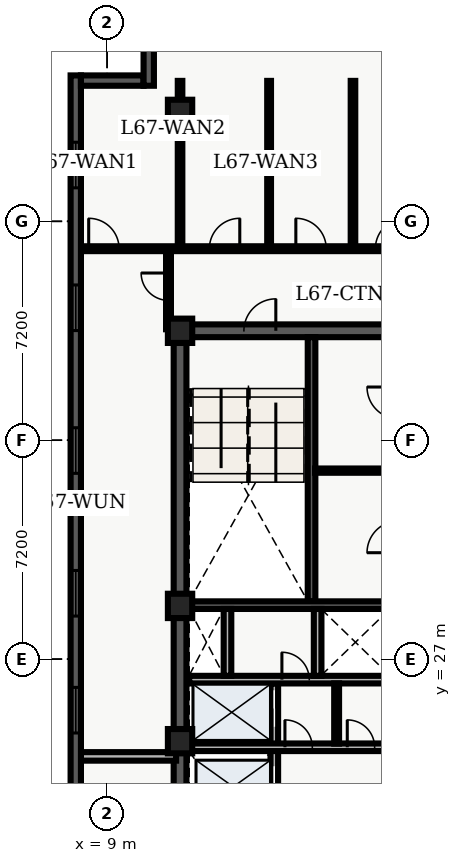
"""IFC4 building model, lengths in metres.
Left out: names, types, materials, properties, quantities, classifications, styles, units other than length and angle.
Written with IfcOpenShell. Run it as: python <this file> out.ifc"""

import sys

from ifc_helpers import new_model, entity, si_unit, converted_unit, direction, frame, origin_with_axes, origin_2d_with_axis, place, context, subcontext, project, spatial, polyline, rectangle, outline, extrude, element, fill, save


model = new_model("IFC4")
c1 = context("Model", 3, precision=1e-05, world=origin_with_axes(), true_north=direction((0.0, 1.0)))
c2 = subcontext(c1, "Body", "Model", "MODEL_VIEW")
j1 = project(units=[si_unit("LENGTHUNIT", "METRE"), converted_unit("PLANEANGLEUNIT", "DEGREE", entity("IfcPlaneAngleMeasure", 0.017), si_unit("PLANEANGLEUNIT", "RADIAN"), dimensions=[0, 0, 0, 0, 0, 0, 0])], contexts=[c1])
p1 = place(None, origin_with_axes())
s1 = spatial("IfcSite", under=j1, at=p1, CompositionType="ELEMENT")
p2 = place(p1, origin_with_axes())
s2 = spatial("IfcBuilding", under=s1, at=p2, CompositionType="ELEMENT")
p3 = place(p2, frame((0.0, 0.0, 272.4), z_axis=(0.0, 0.0, 1.0), x_axis=(1.0, 0.0, 0.0)))
s3 = spatial("IfcBuildingStorey", under=s2, at=p3, CompositionType="ELEMENT", Elevation=272.4)
p4 = place(p3, frame((11.4, 10.8, 0.0), z_axis=(0.0, 0.0, 1.0), x_axis=(0.0, 1.0, 0.0)))
e1 = element("IfcWall", 1, at=p4, inside=s3, PredefinedType="SHEAR", context=c2, shape_type="SweptSolid", body=[
    extrude(outline(polyline([(0.0, -0.21), (27.0, -0.21), (27.0, 0.21), (0.0, 0.21), (0.0, -0.21)])), origin_with_axes(), (0.0, 0.0, 1.0), 3.66),
])
p5 = place(p3, frame((11.4, 37.8, 0.0), z_axis=(0.0, 0.0, 1.0), x_axis=(1.0, 0.0, 0.0)))
e2 = element("IfcWall", 2, at=p5, inside=s3, PredefinedType="SHEAR", context=c2, shape_type="SweptSolid", body=[
    extrude(outline(polyline([(0.0, -0.21), (7.2, -0.21), (7.2, 0.21), (0.0, 0.21), (0.0, -0.21)])), origin_with_axes(), (0.0, 0.0, 1.0), 3.66),
])
p6 = place(p5, frame((2.625, 0.0, 0.0), z_axis=(0.0, 0.0, 1.0), x_axis=(1.0, 0.0, 0.0)))
e3 = element("IfcOpeningElement", 3, at=p6, cuts=e2, PredefinedType="OPENING", context=c2, shape_type="SweptSolid", body=[
    extrude(rectangle(XDim=1.05, YDim=0.44, at=origin_2d_with_axis()), origin_with_axes(), (0.0, 0.0, 1.0), 2.15),
])
p7 = place(p3, frame((15.725, 28.9, 0.0), z_axis=(0.0, 0.0, 1.0), x_axis=(0.0, 1.0, 0.0)))
e4 = element("IfcWall", 4, at=p7, inside=s3, PredefinedType="SHEAR", context=c2, shape_type="SweptSolid", body=[
    extrude(outline(polyline([(0.0, -0.125), (8.69, -0.125), (8.69, 0.125), (0.0, 0.125), (0.0, -0.125)])), origin_with_axes(), (0.0, 0.0, 1.0), 3.66),
])
p8 = place(p3, frame((11.61, 28.775, 0.0), z_axis=(0.0, 0.0, 1.0), x_axis=(1.0, 0.0, 0.0)))
e5 = element("IfcWall", 5, at=p8, inside=s3, PredefinedType="SHEAR", context=c2, shape_type="SweptSolid", body=[
    extrude(outline(polyline([(0.0, -0.125), (6.78, -0.125), (6.78, 0.125), (0.0, 0.125), (0.0, -0.125)])), origin_with_axes(), (0.0, 0.0, 1.0), 3.66),
])
p9 = place(p3, frame((14.5, 19.95, 0.0), z_axis=(0.0, 0.0, 1.0), x_axis=(0.0, 1.0, 0.0)))
e6 = element("IfcWall", 6, at=p9, inside=s3, PredefinedType="SOLIDWALL", context=c2, shape_type="SweptSolid", body=[
    extrude(outline(polyline([(0.0, -0.125), (6.25, -0.125), (6.25, 0.125), (0.0, 0.125), (0.0, -0.125)])), origin_with_axes(), (0.0, 0.0, 1.0), 2.7),
])
p10 = place(p9, frame((1.025, 0.0, 0.0), z_axis=(0.0, 0.0, 1.0), x_axis=(1.0, 0.0, 0.0)))
e7 = element("IfcOpeningElement", 7, at=p10, cuts=e6, PredefinedType="OPENING", context=c2, shape_type="SweptSolid", body=[
    extrude(rectangle(XDim=1.1, YDim=0.27, at=origin_2d_with_axis()), origin_with_axes(), (0.0, 0.0, 1.0), 2.15),
])
p11 = place(p9, frame((2.975, 0.0, 0.0), z_axis=(0.0, 0.0, 1.0), x_axis=(1.0, 0.0, 0.0)))
e8 = element("IfcOpeningElement", 8, at=p11, cuts=e6, PredefinedType="OPENING", context=c2, shape_type="SweptSolid", body=[
    extrude(rectangle(XDim=1.1, YDim=0.27, at=origin_2d_with_axis()), origin_with_axes(), (0.0, 0.0, 1.0), 2.15),
])
p12 = place(p9, frame((5.425, 0.0, 0.0), z_axis=(0.0, 0.0, 1.0), x_axis=(1.0, 0.0, 0.0)))
e9 = element("IfcOpeningElement", 9, at=p12, cuts=e6, PredefinedType="OPENING", context=c2, shape_type="SweptSolid", body=[
    extrude(rectangle(XDim=1.2, YDim=0.27, at=origin_2d_with_axis()), origin_with_axes(), (0.0, 0.0, 1.0), 2.15),
])
p13 = place(p3, frame((11.7, 24.1, 0.0), z_axis=(0.0, 0.0, 1.0), x_axis=(1.0, 0.0, 0.0)))
e10 = element("IfcWall", 10, at=p13, inside=s3, PredefinedType="SOLIDWALL", context=c2, shape_type="SweptSolid", body=[
    extrude(outline(polyline([(0.0, -0.125), (6.6, -0.125), (6.6, 0.125), (0.0, 0.125), (0.0, -0.125)])), origin_with_axes(), (0.0, 0.0, 1.0), 2.7),
])
p14 = place(p13, frame((3.6, 0.0, 0.0), z_axis=(0.0, 0.0, 1.0), x_axis=(1.0, 0.0, 0.0)))
e11 = element("IfcOpeningElement", 11, at=p14, cuts=e10, PredefinedType="OPENING", context=c2, shape_type="SweptSolid", body=[
    extrude(rectangle(XDim=0.9, YDim=0.27, at=origin_2d_with_axis()), origin_with_axes(), (0.0, 0.0, 1.0), 2.15),
])
p15 = place(p13, frame((5.65, 0.0, 0.0), z_axis=(0.0, 0.0, 1.0), x_axis=(1.0, 0.0, 0.0)))
e12 = element("IfcOpeningElement", 12, at=p15, cuts=e10, PredefinedType="OPENING", context=c2, shape_type="SweptSolid", body=[
    extrude(rectangle(XDim=0.9, YDim=0.27, at=origin_2d_with_axis()), origin_with_axes(), (0.0, 0.0, 1.0), 2.15),
])
p16 = place(p3, frame((11.7, 26.325, 0.0), z_axis=(0.0, 0.0, 1.0), x_axis=(1.0, 0.0, 0.0)))
e13 = element("IfcWall", 13, at=p16, inside=s3, PredefinedType="SOLIDWALL", context=c2, shape_type="SweptSolid", body=[
    extrude(outline(polyline([(0.0, -0.125), (6.6, -0.125), (6.6, 0.125), (0.0, 0.125), (0.0, -0.125)])), origin_with_axes(), (0.0, 0.0, 1.0), 2.7),
])
p17 = place(p16, frame((3.5, 0.0, 0.0), z_axis=(0.0, 0.0, 1.0), x_axis=(1.0, 0.0, 0.0)))
e14 = element("IfcOpeningElement", 14, at=p17, cuts=e13, PredefinedType="OPENING", context=c2, shape_type="SweptSolid", body=[
    extrude(rectangle(XDim=0.9, YDim=0.27, at=origin_2d_with_axis()), origin_with_axes(), (0.0, 0.0, 1.0), 2.15),
])
for number, where, z_axis, x_axis in (
    (15, (12.96, 26.45, 0.0), (0.0, 0.0, 1.0), (0.0, 1.0, 0.0)),
    (16, (15.925, 26.45, 0.0), (0.0, 0.0, 1.0), (0.0, 1.0, 0.0)),
):
    element("IfcWall", number, at=place(p3, frame(where, z_axis=z_axis, x_axis=x_axis)), inside=s3, PredefinedType="SOLIDWALL", context=c2, shape_type="SweptSolid", body=[
        extrude(outline(polyline([(0.0, -0.125), (2.2, -0.125), (2.2, 0.125), (0.0, 0.125), (0.0, -0.125)])), origin_with_axes(), (0.0, 0.0, 1.0), 2.7),
    ])
for number, where, z_axis, x_axis in (
    (17, (11.4, 24.3, 0.0), (0.0, 0.0, 1.0), (1.0, 0.0, 0.0)),
    (18, (11.4, 28.75, 0.0), (0.0, 0.0, 1.0), (1.0, 0.0, 0.0)),
    (19, (11.4, 37.8, 0.0), (0.0, 0.0, 1.0), (1.0, 0.0, 0.0)),
    (20, (11.4, 45.0, 0.0), (0.0, 0.0, 1.0), (1.0, 0.0, 0.0)),
):
    element("IfcColumn", number, at=place(p3, frame(where, z_axis=z_axis, x_axis=x_axis)), inside=s3, PredefinedType="COLUMN", context=c2, shape_type="SweptSolid", body=[
        extrude(rectangle(XDim=0.8, YDim=0.8, at=origin_2d_with_axis()), origin_with_axes(), (0.0, 0.0, 1.0), 3.9),
    ])
p18 = place(p3, frame((16.55, 24.22, 0.0), z_axis=(0.0, 0.0, 1.0), x_axis=(0.0, 1.0, 0.0)))
e21 = element("IfcWall", 21, at=p18, inside=s3, PredefinedType="PARTITIONING", context=c2, shape_type="SweptSolid", body=[
    extrude(outline(polyline([(0.0, -0.08), (1.98, -0.08), (1.98, 0.08), (0.0, 0.08), (0.0, -0.08)])), origin_with_axes(), (0.0, 0.0, 1.0), 2.7),
])
p19 = place(p3, frame((15.84, 33.2, 0.0), z_axis=(0.0, 0.0, 1.0), x_axis=(1.0, 0.0, 0.0)))
e22 = element("IfcWall", 22, at=p19, inside=s3, PredefinedType="PARTITIONING", context=c2, shape_type="SweptSolid", body=[
    extrude(outline(polyline([(0.0, -0.07), (2.46, -0.07), (2.46, 0.07), (0.0, 0.07), (0.0, -0.07)])), origin_with_axes(), (0.0, 0.0, 1.0), 2.7),
])
p20 = place(p3, frame((8.135, 40.5, 0.0), z_axis=(0.0, 0.0, 1.0), x_axis=(1.0, 0.0, 0.0)))
e23 = element("IfcWall", 23, at=p20, inside=s3, PredefinedType="PARTITIONING", context=c2, shape_type="SweptSolid", body=[
    extrude(outline(polyline([(0.0, -0.08), (23.93, -0.08), (23.93, 0.08), (0.0, 0.08), (0.0, -0.08)])), origin_with_axes(), (0.0, 0.0, 1.0), 2.7),
])
p21 = place(p20, frame((0.76, 0.0, 0.0), z_axis=(0.0, 0.0, 1.0), x_axis=(1.0, 0.0, 0.0)))
e24 = element("IfcOpeningElement", 24, at=p21, cuts=e23, PredefinedType="OPENING", context=c2, shape_type="SweptSolid", body=[
    extrude(rectangle(XDim=1.0, YDim=0.18, at=origin_2d_with_axis()), origin_with_axes(), (0.0, 0.0, 1.0), 2.15),
])
p22 = place(p20, frame((4.729, 0.0, 0.0), z_axis=(0.0, 0.0, 1.0), x_axis=(1.0, 0.0, 0.0)))
e25 = element("IfcOpeningElement", 25, at=p22, cuts=e23, PredefinedType="OPENING", context=c2, shape_type="SweptSolid", body=[
    extrude(rectangle(XDim=1.0, YDim=0.18, at=origin_2d_with_axis()), origin_with_axes(), (0.0, 0.0, 1.0), 2.15),
])
p23 = place(p20, frame((7.574, 0.0, 0.0), z_axis=(0.0, 0.0, 1.0), x_axis=(1.0, 0.0, 0.0)))
e26 = element("IfcOpeningElement", 26, at=p23, cuts=e23, PredefinedType="OPENING", context=c2, shape_type="SweptSolid", body=[
    extrude(rectangle(XDim=1.0, YDim=0.18, at=origin_2d_with_axis()), origin_with_axes(), (0.0, 0.0, 1.0), 2.15),
])
p24 = place(p20, frame((10.189, 0.0, 0.0), z_axis=(0.0, 0.0, 1.0), x_axis=(1.0, 0.0, 0.0)))
e27 = element("IfcOpeningElement", 27, at=p24, cuts=e23, PredefinedType="OPENING", context=c2, shape_type="SweptSolid", body=[
    extrude(rectangle(XDim=1.0, YDim=0.18, at=origin_2d_with_axis()), origin_with_axes(), (0.0, 0.0, 1.0), 2.15),
])
p25 = place(p3, frame((11.02, 37.85, 0.0), z_axis=(0.0, 0.0, 1.0), x_axis=(0.0, 1.0, 0.0)))
e28 = element("IfcWall", 28, at=p25, inside=s3, PredefinedType="PARTITIONING", context=c2, shape_type="SweptSolid", body=[
    extrude(outline(polyline([(0.0, -0.08), (2.65, -0.08), (2.65, 0.08), (0.0, 0.08), (0.0, -0.08)])), origin_with_axes(), (0.0, 0.0, 1.0), 2.7),
])
p26 = place(p25, frame((1.4, 0.0, 0.0), z_axis=(0.0, 0.0, 1.0), x_axis=(1.0, 0.0, 0.0)))
e29 = element("IfcOpeningElement", 29, at=p26, cuts=e28, PredefinedType="OPENING", context=c2, shape_type="SweptSolid", body=[
    extrude(rectangle(XDim=0.9, YDim=0.18, at=origin_2d_with_axis()), origin_with_axes(), (0.0, 0.0, 1.0), 2.15),
])
p27 = place(p3, frame((8.135, 23.8, 0.0), z_axis=(0.0, 0.0, 1.0), x_axis=(1.0, 0.0, 0.0)))
e30 = element("IfcWall", 30, at=p27, inside=s3, PredefinedType="PARTITIONING", context=c2, shape_type="SweptSolid", body=[
    extrude(outline(polyline([(0.0, -0.14), (3.135, -0.14), (3.135, 0.14), (0.0, 0.14), (0.0, -0.14)])), origin_with_axes(), (0.0, 0.0, 1.0), 2.7),
])
p28 = place(p3, frame((11.4, 40.6, 0.0), z_axis=(0.0, 0.0, 1.0), x_axis=(0.0, 1.0, 0.0)))
e31 = element("IfcWall", 31, at=p28, inside=s3, PredefinedType="PARTITIONING", context=c2, shape_type="SweptSolid", body=[
    extrude(outline(polyline([(0.0, -0.075), (5.42, -0.075), (5.42, 0.075), (0.0, 0.075), (0.0, -0.075)])), origin_with_axes(), (0.0, 0.0, 1.0), 2.7),
])
p29 = place(p3, frame((14.329, 40.6, 0.0), z_axis=(0.0, 0.0, 1.0), x_axis=(0.0, 1.0, 0.0)))
e32 = element("IfcWall", 32, at=p29, inside=s3, PredefinedType="PARTITIONING", context=c2, shape_type="SweptSolid", body=[
    extrude(outline(polyline([(0.0, -0.062), (5.42, -0.062), (5.42, 0.062), (0.0, 0.062), (0.0, -0.062)])), origin_with_axes(), (0.0, 0.0, 1.0), 2.7),
])
p30 = place(p3, frame((17.088, 40.6, 0.0), z_axis=(0.0, 0.0, 1.0), x_axis=(0.0, 1.0, 0.0)))
e33 = element("IfcWall", 33, at=p30, inside=s3, PredefinedType="PARTITIONING", context=c2, shape_type="SweptSolid", body=[
    extrude(outline(polyline([(0.0, -0.075), (5.42, -0.075), (5.42, 0.075), (0.0, 0.075), (0.0, -0.075)])), origin_with_axes(), (0.0, 0.0, 1.0), 2.7),
])
p31 = place(p3, frame((7.97, 2.74, 0.0), z_axis=(0.0, 0.0, 1.0), x_axis=(0.0, 1.0, 0.0)))
e34 = element("IfcWall", 34, at=p31, inside=s3, PredefinedType="SOLIDWALL", context=c2, shape_type="SweptSolid", body=[
    extrude(outline(polyline([(0.0, -0.17), (43.46, -0.17), (43.46, 0.17), (0.0, 0.17), (0.0, -0.17)])), origin_with_axes(), (0.0, 0.0, 1.0), 3.66),
])
p32 = place(p31, frame((2.948, 0.0, 0.45), z_axis=(0.0, 0.0, 1.0), x_axis=(1.0, 0.0, 0.0)))
e35 = element("IfcOpeningElement", 35, at=p32, cuts=e34, PredefinedType="OPENING", context=c2, shape_type="SweptSolid", body=[
    extrude(rectangle(XDim=1.5, YDim=0.36, at=origin_2d_with_axis()), origin_with_axes(), (0.0, 0.0, 1.0), 2.1),
])
p33 = place(p31, frame((7.643, 0.0, 0.45), z_axis=(0.0, 0.0, 1.0), x_axis=(1.0, 0.0, 0.0)))
e36 = element("IfcOpeningElement", 36, at=p33, cuts=e34, PredefinedType="OPENING", context=c2, shape_type="SweptSolid", body=[
    extrude(rectangle(XDim=1.5, YDim=0.36, at=origin_2d_with_axis()), origin_with_axes(), (0.0, 0.0, 1.0), 2.1),
])
p34 = place(p31, frame((12.339, 0.0, 0.45), z_axis=(0.0, 0.0, 1.0), x_axis=(1.0, 0.0, 0.0)))
e37 = element("IfcOpeningElement", 37, at=p34, cuts=e34, PredefinedType="OPENING", context=c2, shape_type="SweptSolid", body=[
    extrude(rectangle(XDim=1.5, YDim=0.36, at=origin_2d_with_axis()), origin_with_axes(), (0.0, 0.0, 1.0), 2.1),
])
p35 = place(p31, frame((17.034, 0.0, 0.45), z_axis=(0.0, 0.0, 1.0), x_axis=(1.0, 0.0, 0.0)))
e38 = element("IfcOpeningElement", 38, at=p35, cuts=e34, PredefinedType="OPENING", context=c2, shape_type="SweptSolid", body=[
    extrude(rectangle(XDim=1.5, YDim=0.36, at=origin_2d_with_axis()), origin_with_axes(), (0.0, 0.0, 1.0), 2.1),
])
p36 = place(p31, frame((22.58, 0.0, 0.45), z_axis=(0.0, 0.0, 1.0), x_axis=(1.0, 0.0, 0.0)))
e39 = element("IfcOpeningElement", 39, at=p36, cuts=e34, PredefinedType="OPENING", context=c2, shape_type="SweptSolid", body=[
    extrude(rectangle(XDim=1.5, YDim=0.36, at=origin_2d_with_axis()), origin_with_axes(), (0.0, 0.0, 1.0), 2.1),
])
p37 = place(p31, frame((26.426, 0.0, 0.45), z_axis=(0.0, 0.0, 1.0), x_axis=(1.0, 0.0, 0.0)))
e40 = element("IfcOpeningElement", 40, at=p37, cuts=e34, PredefinedType="OPENING", context=c2, shape_type="SweptSolid", body=[
    extrude(rectangle(XDim=1.5, YDim=0.36, at=origin_2d_with_axis()), origin_with_axes(), (0.0, 0.0, 1.0), 2.1),
])
p38 = place(p31, frame((31.121, 0.0, 0.45), z_axis=(0.0, 0.0, 1.0), x_axis=(1.0, 0.0, 0.0)))
e41 = element("IfcOpeningElement", 41, at=p38, cuts=e34, PredefinedType="OPENING", context=c2, shape_type="SweptSolid", body=[
    extrude(rectangle(XDim=1.5, YDim=0.36, at=origin_2d_with_axis()), origin_with_axes(), (0.0, 0.0, 1.0), 2.1),
])
p39 = place(p31, frame((35.817, 0.0, 0.45), z_axis=(0.0, 0.0, 1.0), x_axis=(1.0, 0.0, 0.0)))
e42 = element("IfcOpeningElement", 42, at=p39, cuts=e34, PredefinedType="OPENING", context=c2, shape_type="SweptSolid", body=[
    extrude(rectangle(XDim=1.5, YDim=0.36, at=origin_2d_with_axis()), origin_with_axes(), (0.0, 0.0, 1.0), 2.1),
])
p40 = place(p31, frame((40.512, 0.0, 0.45), z_axis=(0.0, 0.0, 1.0), x_axis=(1.0, 0.0, 0.0)))
e43 = element("IfcOpeningElement", 43, at=p40, cuts=e34, PredefinedType="OPENING", context=c2, shape_type="SweptSolid", body=[
    extrude(rectangle(XDim=1.5, YDim=0.36, at=origin_2d_with_axis()), origin_with_axes(), (0.0, 0.0, 1.0), 2.1),
])
p41 = place(p3, frame((8.14, 46.03, 0.0), z_axis=(0.0, 0.0, 1.0), x_axis=(1.0, 0.0, 0.0)))
e44 = element("IfcWall", 44, at=p41, inside=s3, PredefinedType="SOLIDWALL", context=c2, shape_type="SweptSolid", body=[
    extrude(outline(polyline([(0.0, -0.17), (2.06, -0.17), (2.06, 0.17), (0.0, 0.17), (0.0, -0.17)])), origin_with_axes(), (0.0, 0.0, 1.0), 3.66),
])
p42 = place(p3, frame((10.37, 45.86, 0.0), z_axis=(0.0, 0.0, 1.0), x_axis=(0.0, 1.0, 0.0)))
e45 = element("IfcWall", 45, at=p42, inside=s3, PredefinedType="SOLIDWALL", context=c2, shape_type="SweptSolid", body=[
    extrude(outline(polyline([(0.0, -0.17), (2.74, -0.17), (2.74, 0.17), (0.0, 0.17), (0.0, -0.17)])), origin_with_axes(), (0.0, 0.0, 1.0), 3.66),
])
p43 = place(p9, frame((2.975, 0.0, 0.0), z_axis=(0.0, 0.0, 1.0), x_axis=(1.0, 0.0, 0.0)))
e46 = element("IfcDoor", 46, at=p43, inside=s3, OperationType="SLIDING_TO_RIGHT", PredefinedType="DOOR", context=c2, shape_type="SweptSolid", body=[
    extrude(rectangle(XDim=1.1, YDim=0.09, at=origin_2d_with_axis()), origin_with_axes(), (0.0, 0.0, 1.0), 2.15),
])
fill(e8, e46)
p44 = place(p9, frame((5.425, 0.0, 0.0), z_axis=(0.0, 0.0, 1.0), x_axis=(1.0, 0.0, 0.0)))
e47 = element("IfcDoor", 47, at=p44, inside=s3, OperationType="DOUBLE_DOOR_SLIDING", PredefinedType="DOOR", context=c2, shape_type="SweptSolid", body=[
    extrude(rectangle(XDim=1.2, YDim=0.09, at=origin_2d_with_axis()), origin_with_axes(), (0.0, 0.0, 1.0), 2.15),
])
fill(e9, e47)
p45 = place(p5, frame((2.625, 0.0, 0.0), z_axis=(0.0, 0.0, 1.0), x_axis=(1.0, 0.0, 0.0)))
e48 = element("IfcDoor", 48, at=p45, inside=s3, OperationType="SINGLE_SWING_RIGHT", PredefinedType="DOOR", context=c2, shape_type="SweptSolid", body=[
    extrude(rectangle(XDim=1.05, YDim=0.09, at=origin_2d_with_axis()), origin_with_axes(), (0.0, 0.0, 1.0), 2.15),
])
fill(e3, e48)
p46 = place(p13, frame((3.6, 0.0, 0.0), z_axis=(0.0, 0.0, 1.0), x_axis=(1.0, 0.0, 0.0)))
e49 = element("IfcDoor", 49, at=p46, inside=s3, OperationType="SINGLE_SWING_LEFT", PredefinedType="DOOR", context=c2, shape_type="SweptSolid", body=[
    extrude(rectangle(XDim=0.9, YDim=0.09, at=origin_2d_with_axis()), origin_with_axes(), (0.0, 0.0, 1.0), 2.15),
])
fill(e11, e49)
p47 = place(p13, frame((5.65, 0.0, 0.0), z_axis=(0.0, 0.0, 1.0), x_axis=(1.0, 0.0, 0.0)))
e50 = element("IfcDoor", 50, at=p47, inside=s3, OperationType="SINGLE_SWING_LEFT", PredefinedType="DOOR", context=c2, shape_type="SweptSolid", body=[
    extrude(rectangle(XDim=0.9, YDim=0.09, at=origin_2d_with_axis()), origin_with_axes(), (0.0, 0.0, 1.0), 2.15),
])
fill(e12, e50)
p48 = place(p16, frame((3.5, 0.0, 0.0), z_axis=(0.0, 0.0, 1.0), x_axis=(1.0, 0.0, 0.0)))
e51 = element("IfcDoor", 51, at=p48, inside=s3, OperationType="SINGLE_SWING_LEFT", PredefinedType="DOOR", context=c2, shape_type="SweptSolid", body=[
    extrude(rectangle(XDim=0.9, YDim=0.09, at=origin_2d_with_axis()), origin_with_axes(), (0.0, 0.0, 1.0), 2.15),
])
fill(e14, e51)
p49 = place(p25, frame((1.4, 0.0, 0.0), z_axis=(0.0, 0.0, 1.0), x_axis=(1.0, 0.0, 0.0)))
e52 = element("IfcDoor", 52, at=p49, inside=s3, OperationType="SINGLE_SWING_RIGHT", PredefinedType="DOOR", context=c2, shape_type="SweptSolid", body=[
    extrude(rectangle(XDim=0.9, YDim=0.09, at=origin_2d_with_axis()), origin_with_axes(), (0.0, 0.0, 1.0), 2.15),
])
fill(e29, e52)
p50 = place(p20, frame((0.76, 0.0, 0.0), z_axis=(0.0, 0.0, 1.0), x_axis=(1.0, 0.0, 0.0)))
e53 = element("IfcDoor", 53, at=p50, inside=s3, OperationType="SINGLE_SWING_LEFT", PredefinedType="DOOR", context=c2, shape_type="SweptSolid", body=[
    extrude(rectangle(XDim=1.0, YDim=0.09, at=origin_2d_with_axis()), origin_with_axes(), (0.0, 0.0, 1.0), 2.15),
])
fill(e24, e53)
p51 = place(p20, frame((4.729, 0.0, 0.0), z_axis=(0.0, 0.0, 1.0), x_axis=(1.0, 0.0, 0.0)))
e54 = element("IfcDoor", 54, at=p51, inside=s3, OperationType="SINGLE_SWING_RIGHT", PredefinedType="DOOR", context=c2, shape_type="SweptSolid", body=[
    extrude(rectangle(XDim=1.0, YDim=0.09, at=origin_2d_with_axis()), origin_with_axes(), (0.0, 0.0, 1.0), 2.15),
])
fill(e25, e54)
p52 = place(p20, frame((7.574, 0.0, 0.0), z_axis=(0.0, 0.0, 1.0), x_axis=(1.0, 0.0, 0.0)))
e55 = element("IfcDoor", 55, at=p52, inside=s3, OperationType="SINGLE_SWING_LEFT", PredefinedType="DOOR", context=c2, shape_type="SweptSolid", body=[
    extrude(rectangle(XDim=1.0, YDim=0.09, at=origin_2d_with_axis()), origin_with_axes(), (0.0, 0.0, 1.0), 2.15),
])
fill(e26, e55)
p53 = place(p20, frame((10.189, 0.0, 0.0), z_axis=(0.0, 0.0, 1.0), x_axis=(1.0, 0.0, 0.0)))
e56 = element("IfcDoor", 56, at=p53, inside=s3, OperationType="SINGLE_SWING_RIGHT", PredefinedType="DOOR", context=c2, shape_type="SweptSolid", body=[
    extrude(rectangle(XDim=1.0, YDim=0.09, at=origin_2d_with_axis()), origin_with_axes(), (0.0, 0.0, 1.0), 2.15),
])
fill(e27, e56)
p54 = place(p31, frame((22.58, 0.0, 0.45), z_axis=(0.0, 0.0, 1.0), x_axis=(1.0, 0.0, 0.0)))
e57 = element("IfcWindow", 57, at=p54, inside=s3, PredefinedType="WINDOW", context=c2, shape_type="SweptSolid", body=[
    extrude(rectangle(XDim=1.5, YDim=0.09, at=origin_2d_with_axis()), origin_with_axes(), (0.0, 0.0, 1.0), 2.1),
])
fill(e39, e57)
p55 = place(p31, frame((26.426, 0.0, 0.45), z_axis=(0.0, 0.0, 1.0), x_axis=(1.0, 0.0, 0.0)))
e58 = element("IfcWindow", 58, at=p55, inside=s3, PredefinedType="WINDOW", context=c2, shape_type="SweptSolid", body=[
    extrude(rectangle(XDim=1.5, YDim=0.09, at=origin_2d_with_axis()), origin_with_axes(), (0.0, 0.0, 1.0), 2.1),
])
fill(e40, e58)
p56 = place(p31, frame((31.121, 0.0, 0.45), z_axis=(0.0, 0.0, 1.0), x_axis=(1.0, 0.0, 0.0)))
e59 = element("IfcWindow", 59, at=p56, inside=s3, PredefinedType="WINDOW", context=c2, shape_type="SweptSolid", body=[
    extrude(rectangle(XDim=1.5, YDim=0.09, at=origin_2d_with_axis()), origin_with_axes(), (0.0, 0.0, 1.0), 2.1),
])
fill(e41, e59)
p57 = place(p31, frame((35.817, 0.0, 0.45), z_axis=(0.0, 0.0, 1.0), x_axis=(1.0, 0.0, 0.0)))
e60 = element("IfcWindow", 60, at=p57, inside=s3, PredefinedType="WINDOW", context=c2, shape_type="SweptSolid", body=[
    extrude(rectangle(XDim=1.5, YDim=0.09, at=origin_2d_with_axis()), origin_with_axes(), (0.0, 0.0, 1.0), 2.1),
])
fill(e42, e60)
p58 = place(p31, frame((40.512, 0.0, 0.45), z_axis=(0.0, 0.0, 1.0), x_axis=(1.0, 0.0, 0.0)))
e61 = element("IfcWindow", 61, at=p58, inside=s3, PredefinedType="WINDOW", context=c2, shape_type="SweptSolid", body=[
    extrude(rectangle(XDim=1.5, YDim=0.09, at=origin_2d_with_axis()), origin_with_axes(), (0.0, 0.0, 1.0), 2.1),
])
fill(e43, e61)
save(model, sys.argv[1])
